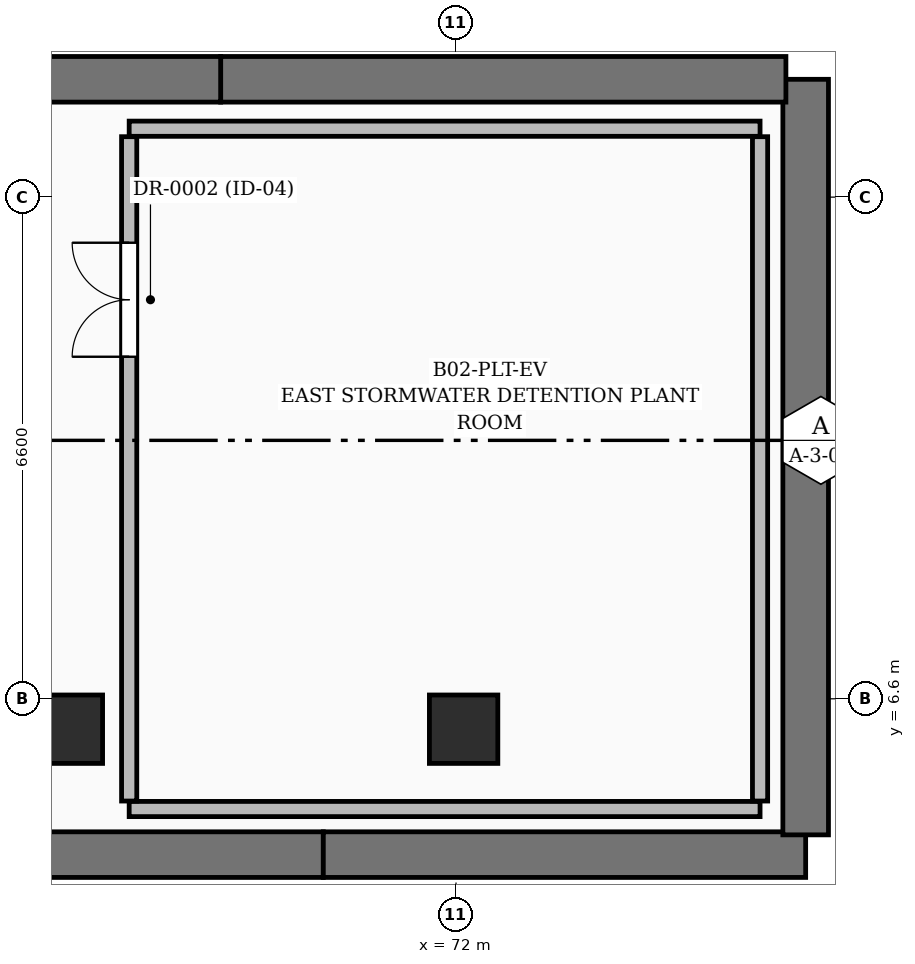
"""IFC4 building model, lengths in metres.
Left out: names, types, materials, properties, quantities, classifications, styles, units other than length and angle.
Written with IfcOpenShell. Run it as: python <this file> out.ifc"""

import sys

from ifc_helpers import new_model, si_unit, direction, frame, frame_2d, origin, origin_2d, place, context, subcontext, project, spatial, rectangle, extrude, element, fill, save


model = new_model("IFC4")
c1 = context("Model", 3, precision=1e-05, world=origin(), true_north=direction((0.0, 1.0)))
c2 = subcontext(c1, "Body", "Model", "MODEL_VIEW")
j1 = project(units=[si_unit("LENGTHUNIT", "METRE"), si_unit("PLANEANGLEUNIT", "RADIAN")], contexts=[c1])
p1 = place(None, origin())
s1 = spatial("IfcSite", under=j1, at=p1, CompositionType="ELEMENT")
p2 = place(p1, origin())
s2 = spatial("IfcBuilding", under=s1, at=p2, CompositionType="ELEMENT")
p3 = place(p2, frame((0.0, 0.0, -9.0)))
s3 = spatial("IfcBuildingStorey", under=s2, at=p3, CompositionType="ELEMENT", Elevation=-9.0)
p4 = place(p3, frame((63.908, 4.55, 0.0), z_axis=(0.0, 0.0, 1.0), x_axis=(1.0, 0.0, 0.0)))
e1 = element("IfcWall", 1, at=p4, inside=s3, PredefinedType="USERDEFINED", context=c2, shape_type="SweptSolid", body=[
    extrude(rectangle(XDim=6.346, YDim=0.6, at=frame_2d((3.173, 0.0))), origin(), (0.0, 0.0, 1.0), 4.5),
])
p5 = place(p3, frame((70.254, 4.55, 0.0), z_axis=(0.0, 0.0, 1.0), x_axis=(1.0, 0.0, 0.0)))
e2 = element("IfcWall", 2, at=p5, inside=s3, PredefinedType="USERDEFINED", context=c2, shape_type="SweptSolid", body=[
    extrude(rectangle(XDim=6.346, YDim=0.6, at=frame_2d((3.173, 0.0))), origin(), (0.0, 0.0, 1.0), 4.5),
])
p6 = place(p3, frame((76.6, 4.81, 0.0), z_axis=(0.0, 0.0, 1.0), x_axis=(0.0, 1.0, 0.0)))
e3 = element("IfcWall", 3, at=p6, inside=s3, PredefinedType="USERDEFINED", context=c2, shape_type="SweptSolid", body=[
    extrude(rectangle(XDim=9.94, YDim=0.6, at=frame_2d((4.97, 0.0))), origin(), (0.0, 0.0, 1.0), 4.5),
])
for number, where, z_axis, x_axis in (
    (4, (76.34, 14.75, 0.0), (0.0, 0.0, 1.0), (-1.0, 0.0, 0.0)),
    (5, (68.904, 14.75, 0.0), (0.0, 0.0, 1.0), (-1.0, 0.0, 0.0)),
):
    element("IfcWall", number, at=place(p3, frame(where, z_axis=z_axis, x_axis=x_axis)), inside=s3, PredefinedType="USERDEFINED", context=c2, shape_type="SweptSolid", body=[
        extrude(rectangle(XDim=7.437, YDim=0.6, at=frame_2d((3.718, 0.0))), origin(), (0.0, 0.0, 1.0), 4.5),
    ])
for number, where, z_axis, x_axis in (
    (6, (72.1, 6.2, 0.0), (0.0, 0.0, 1.0), (1.0, 0.0, 0.0)),
    (7, (66.9, 6.2, 0.0), (0.0, 0.0, 1.0), (1.0, 0.0, 0.0)),
):
    element("IfcColumn", number, at=place(p3, frame(where, z_axis=z_axis, x_axis=x_axis)), inside=s3, PredefinedType="COLUMN", context=c2, shape_type="SweptSolid", body=[
        extrude(rectangle(XDim=0.9, YDim=0.9, at=origin_2d()), origin(), (0.0, 0.0, 1.0), 4.5),
    ])
for number, where, z_axis, x_axis in (
    (8, (67.7, 5.15, 0.0), (0.0, 0.0, 1.0), (1.0, 0.0, 0.0)),
    (9, (67.7, 14.1, 0.0), (0.0, 0.0, 1.0), (1.0, 0.0, 0.0)),
):
    element("IfcWall", number, at=place(p3, frame(where, z_axis=z_axis, x_axis=x_axis)), inside=s3, PredefinedType="PARTITIONING", context=c2, shape_type="SweptSolid", body=[
        extrude(rectangle(XDim=8.3, YDim=0.2, at=frame_2d((4.15, 0.0))), origin(), (0.0, 0.0, 1.0), 3.464),
    ])
p7 = place(p3, frame((67.7, 5.255, 0.0), z_axis=(0.0, 0.0, 1.0), x_axis=(0.0, 1.0, 0.0)))
e10 = element("IfcWall", 10, at=p7, inside=s3, PredefinedType="PARTITIONING", context=c2, shape_type="SweptSolid", body=[
    extrude(rectangle(XDim=8.74, YDim=0.2, at=frame_2d((4.37, 0.0))), origin(), (0.0, 0.0, 1.0), 3.464),
])
p8 = place(p7, frame((5.845, 0.0, 0.0)))
e11 = element("IfcOpeningElement", 11, at=p8, cuts=e10, PredefinedType="OPENING", context=c2, shape_type="SweptSolid", body=[
    extrude(rectangle(XDim=1.5, YDim=2.2, at=frame_2d((0.75, 1.1))), frame((0.0, 0.11, 0.0), z_axis=(0.0, -1.0, 0.0), x_axis=(1.0, 0.0, 0.0)), (0.0, 0.0, 1.0), 0.22),
])
p9 = place(p3, frame((76.0, 5.255, 0.0), z_axis=(0.0, 0.0, 1.0), x_axis=(0.0, 1.0, 0.0)))
e12 = element("IfcWall", 12, at=p9, inside=s3, PredefinedType="PARTITIONING", context=c2, shape_type="SweptSolid", body=[
    extrude(rectangle(XDim=8.74, YDim=0.2, at=frame_2d((4.37, 0.0))), origin(), (0.0, 0.0, 1.0), 3.464),
])
p10 = place(p8, origin())
e13 = element("IfcDoor", 13, at=p10, inside=s3, OperationType="DOUBLE_DOOR_SINGLE_SWING", PredefinedType="DOOR", context=c2, shape_type="SweptSolid", body=[
    extrude(rectangle(XDim=1.5, YDim=2.2, at=frame_2d((0.75, 1.1))), frame((0.0, 0.025, 0.0), z_axis=(0.0, -1.0, 0.0), x_axis=(1.0, 0.0, 0.0)), (0.0, 0.0, 1.0), 0.05),
])
fill(e11, e13)
save(model, sys.argv[1])
